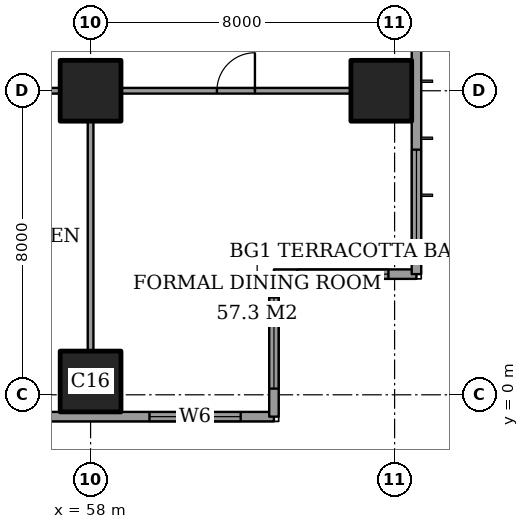
"""IFC4 building model, lengths in metres.
Left out: names, types, materials, properties, quantities, classifications, styles, units other than length and angle.
Written with IfcOpenShell. Run it as: python <this file> out.ifc"""

import sys

from ifc_helpers import new_model, si_unit, direction, frame, frame_2d, origin, origin_2d, place, context, subcontext, project, spatial, rectangle, extrude, element, fill, save


model = new_model("IFC4")
c1 = context("Model", 3, precision=1e-05, world=origin(), true_north=direction((0.0, 1.0)))
c2 = subcontext(c1, "Body", "Model", "MODEL_VIEW")
j1 = project(units=[si_unit("LENGTHUNIT", "METRE"), si_unit("PLANEANGLEUNIT", "RADIAN")], contexts=[c1])
p1 = place(None, origin())
s1 = spatial("IfcSite", under=j1, at=p1, CompositionType="ELEMENT")
p2 = place(p1, origin())
s2 = spatial("IfcBuilding", under=s1, at=p2, CompositionType="ELEMENT")
p3 = place(p2, frame((0.0, 0.0, 270.0)))
s3 = spatial("IfcBuildingStorey", under=s2, at=p3, CompositionType="ELEMENT", Elevation=270.0)
for number, where, z_axis, x_axis in (
    (1, (58.0, 0.35, 0.0), (0.0, 0.0, 1.0), (1.0, 0.0, 0.0)),
    (2, (58.0, 8.0, 0.0), (0.0, 0.0, 1.0), (1.0, 0.0, 0.0)),
    (3, (65.65, 8.0, 0.0), (0.0, 0.0, 1.0), (1.0, 0.0, 0.0)),
):
    element("IfcColumn", number, at=place(p3, frame(where, z_axis=z_axis, x_axis=x_axis)), inside=s3, PredefinedType="COLUMN", context=c2, shape_type="SweptSolid", body=[
        extrude(rectangle(XDim=1.6, YDim=1.6, at=origin_2d()), origin(), (0.0, 0.0, 1.0), 3.6),
    ])
p4 = place(p3, frame((41.425, -0.575, 0.0), z_axis=(0.0, 0.0, 1.0), x_axis=(1.0, 0.0, 0.0)))
e4 = element("IfcWall", 4, at=p4, inside=s3, PredefinedType="SOLIDWALL", context=c2, shape_type="SweptSolid", body=[
    extrude(rectangle(XDim=21.4, YDim=0.25, at=frame_2d((10.7, 0.0))), origin(), (0.0, 0.0, 1.0), 3.6),
])
p5 = place(p4, frame((3.65, 0.0, 0.6)))
e5 = element("IfcOpeningElement", 5, at=p5, cuts=e4, PredefinedType="OPENING", context=c2, shape_type="SweptSolid", body=[
    extrude(rectangle(XDim=2.4, YDim=2.0, at=frame_2d((1.2, 1.0))), frame((0.0, 0.135, 0.0), z_axis=(0.0, -1.0, 0.0), x_axis=(1.0, 0.0, 0.0)), (0.0, 0.0, 1.0), 0.27),
])
p6 = place(p4, frame((9.875, 0.0, 0.6)))
e6 = element("IfcOpeningElement", 6, at=p6, cuts=e4, PredefinedType="OPENING", context=c2, shape_type="SweptSolid", body=[
    extrude(rectangle(XDim=1.2, YDim=2.0, at=frame_2d((0.6, 1.0))), frame((0.0, 0.135, 0.0), z_axis=(0.0, -1.0, 0.0), x_axis=(1.0, 0.0, 0.0)), (0.0, 0.0, 1.0), 0.27),
])
p7 = place(p4, frame((12.475, 0.0, 0.6)))
e7 = element("IfcOpeningElement", 7, at=p7, cuts=e4, PredefinedType="OPENING", context=c2, shape_type="SweptSolid", body=[
    extrude(rectangle(XDim=2.4, YDim=2.0, at=frame_2d((1.2, 1.0))), frame((0.0, 0.135, 0.0), z_axis=(0.0, -1.0, 0.0), x_axis=(1.0, 0.0, 0.0)), (0.0, 0.0, 1.0), 0.27),
])
p8 = place(p4, frame((18.125, 0.0, 0.6)))
e8 = element("IfcOpeningElement", 8, at=p8, cuts=e4, PredefinedType="OPENING", context=c2, shape_type="SweptSolid", body=[
    extrude(rectangle(XDim=2.4, YDim=2.0, at=frame_2d((1.2, 1.0))), frame((0.0, 0.135, 0.0), z_axis=(0.0, -1.0, 0.0), x_axis=(1.0, 0.0, 0.0)), (0.0, 0.0, 1.0), 0.27),
])
p9 = place(p3, frame((62.825, -0.575, 0.0), z_axis=(0.0, 0.0, 1.0), x_axis=(0.0, 1.0, 0.0)))
e9 = element("IfcWall", 9, at=p9, inside=s3, PredefinedType="SOLIDWALL", context=c2, shape_type="SweptSolid", body=[
    extrude(rectangle(XDim=3.75, YDim=0.25, at=frame_2d((1.875, 0.0))), origin(), (0.0, 0.0, 1.0), 3.6),
])
p10 = place(p9, frame((0.738, 0.0, 0.6)))
e10 = element("IfcOpeningElement", 10, at=p10, cuts=e9, PredefinedType="OPENING", context=c2, shape_type="SweptSolid", body=[
    extrude(rectangle(XDim=2.4, YDim=2.0, at=frame_2d((1.2, 1.0))), frame((0.0, 0.135, 0.0), z_axis=(0.0, -1.0, 0.0), x_axis=(1.0, 0.0, 0.0)), (0.0, 0.0, 1.0), 0.27),
])
p11 = place(p3, frame((62.825, 3.175, 0.0), z_axis=(0.0, 0.0, 1.0), x_axis=(1.0, 0.0, 0.0)))
e11 = element("IfcWall", 11, at=p11, inside=s3, PredefinedType="SOLIDWALL", context=c2, shape_type="SweptSolid", body=[
    extrude(rectangle(XDim=3.75, YDim=0.25, at=frame_2d((1.875, 0.0))), origin(), (0.0, 0.0, 1.0), 3.6),
])
p12 = place(p11, frame((0.613, 0.0, 0.6)))
e12 = element("IfcOpeningElement", 12, at=p12, cuts=e11, PredefinedType="OPENING", context=c2, shape_type="SweptSolid", body=[
    extrude(rectangle(XDim=2.4, YDim=2.0, at=frame_2d((1.2, 1.0))), frame((0.0, 0.135, 0.0), z_axis=(0.0, -1.0, 0.0), x_axis=(1.0, 0.0, 0.0)), (0.0, 0.0, 1.0), 0.27),
])
p13 = place(p3, frame((66.575, 3.175, 0.0), z_axis=(0.0, 0.0, 1.0), x_axis=(0.0, 1.0, 0.0)))
e13 = element("IfcWall", 13, at=p13, inside=s3, PredefinedType="SOLIDWALL", context=c2, shape_type="SweptSolid", body=[
    extrude(rectangle(XDim=41.65, YDim=0.25, at=frame_2d((20.825, 0.0))), origin(), (0.0, 0.0, 1.0), 3.6),
])
p14 = place(p13, frame((0.875, 0.0, 0.6)))
e14 = element("IfcOpeningElement", 14, at=p14, cuts=e13, PredefinedType="OPENING", context=c2, shape_type="SweptSolid", body=[
    extrude(rectangle(XDim=2.4, YDim=2.0, at=frame_2d((1.2, 1.0))), frame((0.0, 0.135, 0.0), z_axis=(0.0, -1.0, 0.0), x_axis=(1.0, 0.0, 0.0)), (0.0, 0.0, 1.0), 0.27),
])
p15 = place(p13, frame((6.0, 0.0, 0.6)))
e15 = element("IfcOpeningElement", 15, at=p15, cuts=e13, PredefinedType="OPENING", context=c2, shape_type="SweptSolid", body=[
    extrude(rectangle(XDim=1.2, YDim=2.0, at=frame_2d((0.6, 1.0))), frame((0.0, 0.135, 0.0), z_axis=(0.0, -1.0, 0.0), x_axis=(1.0, 0.0, 0.0)), (0.0, 0.0, 1.0), 0.27),
])
p16 = place(p13, frame((8.525, 0.0, 0.6)))
e16 = element("IfcOpeningElement", 16, at=p16, cuts=e13, PredefinedType="OPENING", context=c2, shape_type="SweptSolid", body=[
    extrude(rectangle(XDim=2.4, YDim=2.0, at=frame_2d((1.2, 1.0))), frame((0.0, 0.135, 0.0), z_axis=(0.0, -1.0, 0.0), x_axis=(1.0, 0.0, 0.0)), (0.0, 0.0, 1.0), 0.27),
])
p17 = place(p13, frame((15.725, 0.0, 0.6)))
e17 = element("IfcOpeningElement", 17, at=p17, cuts=e13, PredefinedType="OPENING", context=c2, shape_type="SweptSolid", body=[
    extrude(rectangle(XDim=2.4, YDim=2.0, at=frame_2d((1.2, 1.0))), frame((0.0, 0.135, 0.0), z_axis=(0.0, -1.0, 0.0), x_axis=(1.0, 0.0, 0.0)), (0.0, 0.0, 1.0), 0.27),
])
p18 = place(p13, frame((23.625, 0.0, 0.6)))
e18 = element("IfcOpeningElement", 18, at=p18, cuts=e13, PredefinedType="OPENING", context=c2, shape_type="SweptSolid", body=[
    extrude(rectangle(XDim=2.4, YDim=2.0, at=frame_2d((1.2, 1.0))), frame((0.0, 0.135, 0.0), z_axis=(0.0, -1.0, 0.0), x_axis=(1.0, 0.0, 0.0)), (0.0, 0.0, 1.0), 0.27),
])
p19 = place(p13, frame((30.725, 0.0, 0.6)))
e19 = element("IfcOpeningElement", 19, at=p19, cuts=e13, PredefinedType="OPENING", context=c2, shape_type="SweptSolid", body=[
    extrude(rectangle(XDim=2.4, YDim=2.0, at=frame_2d((1.2, 1.0))), frame((0.0, 0.135, 0.0), z_axis=(0.0, -1.0, 0.0), x_axis=(1.0, 0.0, 0.0)), (0.0, 0.0, 1.0), 0.27),
])
p20 = place(p13, frame((34.525, 0.0, 0.6)))
e20 = element("IfcOpeningElement", 20, at=p20, cuts=e13, PredefinedType="OPENING", context=c2, shape_type="SweptSolid", body=[
    extrude(rectangle(XDim=1.2, YDim=2.0, at=frame_2d((0.6, 1.0))), frame((0.0, 0.135, 0.0), z_axis=(0.0, -1.0, 0.0), x_axis=(1.0, 0.0, 0.0)), (0.0, 0.0, 1.0), 0.27),
])
p21 = place(p13, frame((38.375, 0.0, 0.6)))
e21 = element("IfcOpeningElement", 21, at=p21, cuts=e13, PredefinedType="OPENING", context=c2, shape_type="SweptSolid", body=[
    extrude(rectangle(XDim=2.4, YDim=2.0, at=frame_2d((1.2, 1.0))), frame((0.0, 0.135, 0.0), z_axis=(0.0, -1.0, 0.0), x_axis=(1.0, 0.0, 0.0)), (0.0, 0.0, 1.0), 0.27),
])
p22 = place(p3, frame((51.2, 8.0, 0.0), z_axis=(0.0, 0.0, 1.0), x_axis=(1.0, 0.0, 0.0)))
e22 = element("IfcWall", 22, at=p22, inside=s3, PredefinedType="PARTITIONING", context=c2, shape_type="SweptSolid", body=[
    extrude(rectangle(XDim=6.0, YDim=0.15, at=frame_2d((3.0, 0.0))), origin(), (0.0, 0.0, 1.0), 3.35),
])
p23 = place(p22, frame((3.4, 0.0, 0.0)))
e23 = element("IfcOpeningElement", 23, at=p23, cuts=e22, PredefinedType="OPENING", context=c2, shape_type="SweptSolid", body=[
    extrude(rectangle(XDim=1.0, YDim=2.1, at=frame_2d((0.5, 1.05))), frame((0.0, 0.085, 0.0), z_axis=(0.0, -1.0, 0.0), x_axis=(1.0, 0.0, 0.0)), (0.0, 0.0, 1.0), 0.17),
])
p24 = place(p3, frame((58.8, 8.0, 0.0), z_axis=(0.0, 0.0, 1.0), x_axis=(1.0, 0.0, 0.0)))
e24 = element("IfcWall", 24, at=p24, inside=s3, PredefinedType="PARTITIONING", context=c2, shape_type="SweptSolid", body=[
    extrude(rectangle(XDim=6.05, YDim=0.15, at=frame_2d((3.025, 0.0))), origin(), (0.0, 0.0, 1.0), 3.35),
])
p25 = place(p24, frame((2.525, 0.0, 0.0)))
e25 = element("IfcOpeningElement", 25, at=p25, cuts=e24, PredefinedType="OPENING", context=c2, shape_type="SweptSolid", body=[
    extrude(rectangle(XDim=1.0, YDim=2.1, at=frame_2d((0.5, 1.05))), frame((0.0, 0.085, 0.0), z_axis=(0.0, -1.0, 0.0), x_axis=(1.0, 0.0, 0.0)), (0.0, 0.0, 1.0), 0.17),
])
p26 = place(p3, frame((58.0, 1.15, 0.0), z_axis=(0.0, 0.0, 1.0), x_axis=(0.0, 1.0, 0.0)))
e26 = element("IfcWall", 26, at=p26, inside=s3, PredefinedType="PARTITIONING", context=c2, shape_type="SweptSolid", body=[
    extrude(rectangle(XDim=6.05, YDim=0.15, at=frame_2d((3.025, 0.0))), origin(), (0.0, 0.0, 1.0), 3.35),
])
p27 = place(p8, origin())
e27 = element("IfcWindow", 27, at=p27, inside=s3, PartitioningType="SINGLE_PANEL", PredefinedType="WINDOW", context=c2, shape_type="SweptSolid", body=[
    extrude(rectangle(XDim=2.4, YDim=2.0, at=frame_2d((1.2, 1.0))), frame((0.0, 0.03, 0.0), z_axis=(0.0, -1.0, 0.0), x_axis=(1.0, 0.0, 0.0)), (0.0, 0.0, 1.0), 0.06),
])
fill(e8, e27)
p28 = place(p10, origin())
e28 = element("IfcWindow", 28, at=p28, inside=s3, PartitioningType="SINGLE_PANEL", PredefinedType="WINDOW", context=c2, shape_type="SweptSolid", body=[
    extrude(rectangle(XDim=2.4, YDim=2.0, at=frame_2d((1.2, 1.0))), frame((0.0, 0.03, 0.0), z_axis=(0.0, -1.0, 0.0), x_axis=(1.0, 0.0, 0.0)), (0.0, 0.0, 1.0), 0.06),
])
fill(e10, e28)
p29 = place(p12, origin())
e29 = element("IfcWindow", 29, at=p29, inside=s3, PartitioningType="SINGLE_PANEL", PredefinedType="WINDOW", context=c2, shape_type="SweptSolid", body=[
    extrude(rectangle(XDim=2.4, YDim=2.0, at=frame_2d((1.2, 1.0))), frame((0.0, 0.03, 0.0), z_axis=(0.0, -1.0, 0.0), x_axis=(1.0, 0.0, 0.0)), (0.0, 0.0, 1.0), 0.06),
])
fill(e12, e29)
p30 = place(p14, origin())
e30 = element("IfcWindow", 30, at=p30, inside=s3, PartitioningType="SINGLE_PANEL", PredefinedType="WINDOW", context=c2, shape_type="SweptSolid", body=[
    extrude(rectangle(XDim=2.4, YDim=2.0, at=frame_2d((1.2, 1.0))), frame((0.0, 0.03, 0.0), z_axis=(0.0, -1.0, 0.0), x_axis=(1.0, 0.0, 0.0)), (0.0, 0.0, 1.0), 0.06),
])
fill(e14, e30)
p31 = place(p25, origin())
e31 = element("IfcDoor", 31, at=p31, inside=s3, OperationType="SINGLE_SWING_LEFT", PredefinedType="DOOR", context=c2, shape_type="SweptSolid", body=[
    extrude(rectangle(XDim=1.0, YDim=2.1, at=frame_2d((0.5, 1.05))), frame((0.0, 0.025, 0.0), z_axis=(0.0, -1.0, 0.0), x_axis=(1.0, 0.0, 0.0)), (0.0, 0.0, 1.0), 0.05),
])
fill(e25, e31)
save(model, sys.argv[1])
